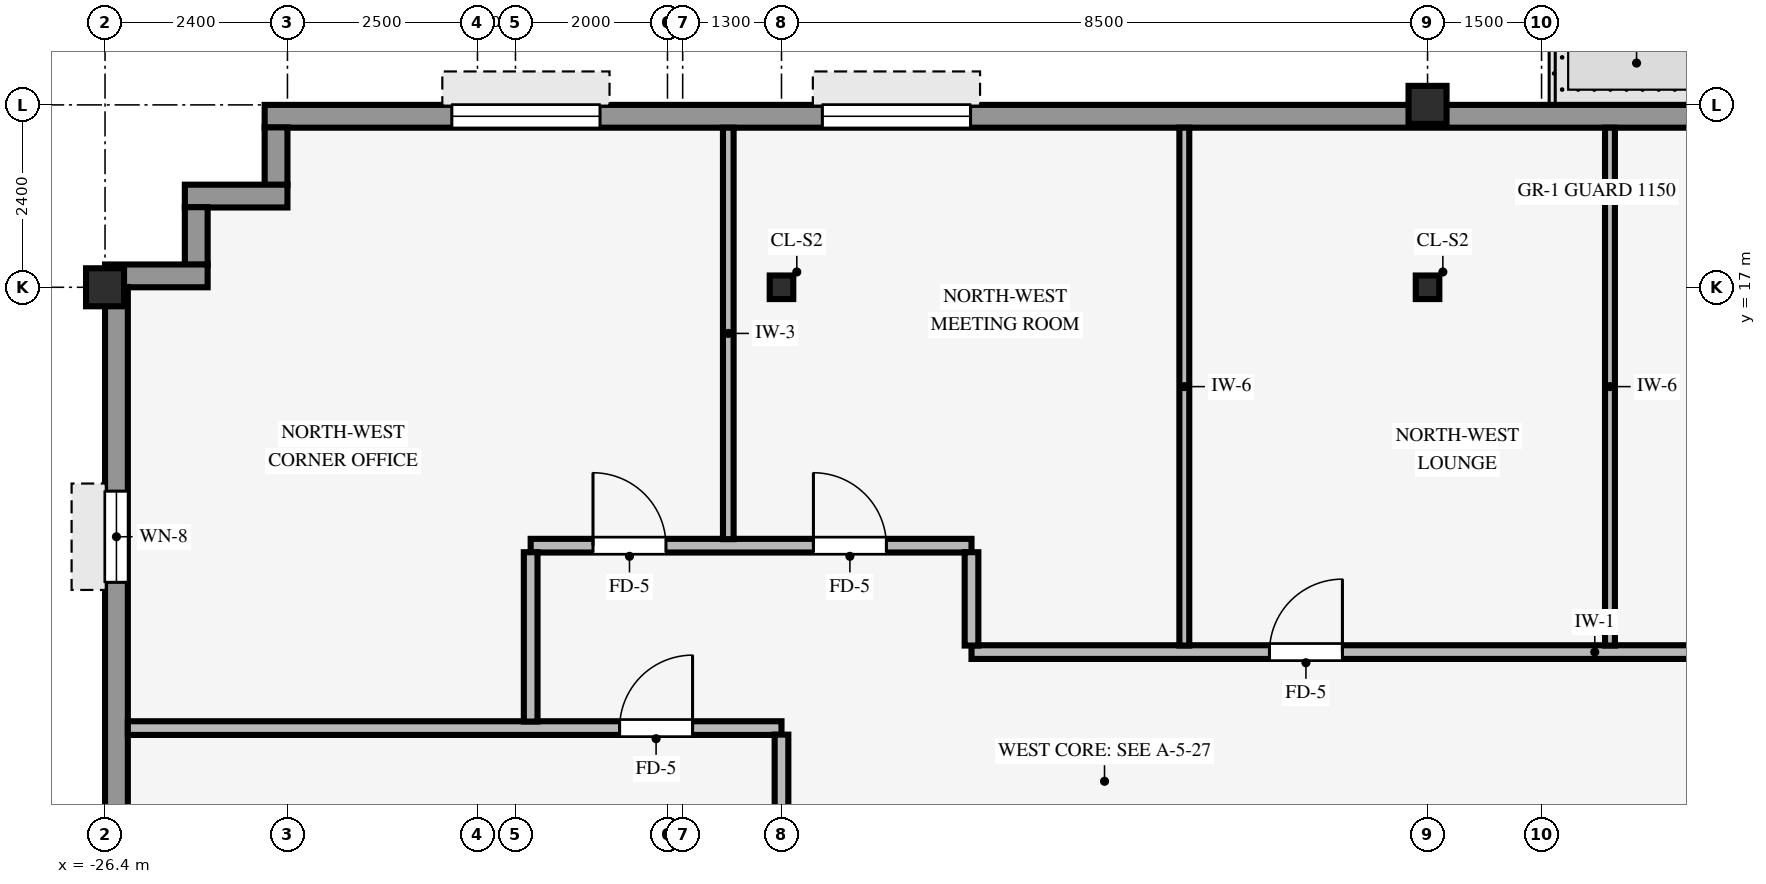
"""IFC4 building model, lengths in metres.
Left out: names, types, materials, properties, quantities, classifications, styles, units other than length and angle.
Written with IfcOpenShell. Run it as: python <this file> out.ifc"""

import sys

from ifc_helpers import new_model, si_unit, direction, frame, frame_2d, origin, origin_2d, place, context, subcontext, project, spatial, rectangle, hollow_rectangle, i_section, extrude, source, transform, mapped, element, fill, save


model = new_model("IFC4")
c1 = context("Model", 3, precision=1e-05, world=origin(), true_north=direction((0.0, 1.0)))
c2 = subcontext(c1, "Body", "Model", "MODEL_VIEW")
j1 = project(units=[si_unit("LENGTHUNIT", "METRE"), si_unit("PLANEANGLEUNIT", "RADIAN")], contexts=[c1])
p1 = place(None, origin())
s1 = spatial("IfcSite", under=j1, at=p1, CompositionType="ELEMENT")
p2 = place(p1, origin())
s2 = spatial("IfcBuilding", under=s1, at=p2, CompositionType="ELEMENT")
p3 = place(p2, frame((0.0, 0.0, 231.05)))
s3 = spatial("IfcBuildingStorey", under=s2, at=p3, CompositionType="ELEMENT", Elevation=231.05)
for number, where, z_axis, x_axis in (
    (1, (-26.4, 17.0, 0.0), (0.0, 0.0, 1.0), (1.0, 0.0, 0.0)),
    (2, (-9.0, 19.4, 0.0), (0.0, 0.0, 1.0), (1.0, 0.0, 0.0)),
):
    element("IfcColumn", number, at=place(p3, frame(where, z_axis=z_axis, x_axis=x_axis)), inside=s3, PredefinedType="COLUMN", context=c2, shape_type="SweptSolid", body=[
        extrude(hollow_rectangle(XDim=0.5, YDim=0.5, WallThickness=0.032, InnerFilletRadius=0.032, OuterFilletRadius=0.064, at=origin_2d()), origin(), (0.0, 0.0, 1.0), 3.37),
    ])
for number, where, z_axis, x_axis in (
    (3, (-17.5, 17.0, 0.0), (0.0, 0.0, 1.0), (1.0, 0.0, 0.0)),
    (4, (-9.0, 17.0, 0.0), (0.0, 0.0, 1.0), (1.0, 0.0, 0.0)),
):
    element("IfcColumn", number, at=place(p3, frame(where, z_axis=z_axis, x_axis=x_axis)), inside=s3, PredefinedType="COLUMN", context=c2, shape_type="SweptSolid", body=[
        extrude(i_section(OverallWidth=0.31, OverallDepth=0.31, WebThickness=0.015, FlangeThickness=0.015, FilletRadius=0.015, at=origin_2d()), origin(), (0.0, 0.0, 1.0), 3.37),
    ])
p4 = place(p3, frame((-24.3, 19.25, 0.0), z_axis=(0.0, 0.0, 1.0), x_axis=(1.0, 0.0, 0.0)))
e5 = element("IfcWall", 5, at=p4, inside=s3, PredefinedType="STANDARD", context=c2, shape_type="SweptSolid", body=[
    extrude(rectangle(XDim=41.0, YDim=0.3, at=frame_2d((20.5, 0.0))), origin(), (0.0, 0.0, 1.0), 2.705),
])
p5 = place(p4, frame((19.0, 0.0, 0.0)))
e6 = element("IfcOpeningElement", 6, at=p5, cuts=e5, PredefinedType="OPENING", context=c2, shape_type="SweptSolid", body=[
    extrude(rectangle(XDim=0.98, YDim=2.15, at=frame_2d((0.49, 1.075))), frame((0.0, 0.16, 0.0), z_axis=(0.0, -1.0, 0.0), x_axis=(1.0, 0.0, 0.0)), (0.0, 0.0, 1.0), 0.32),
])
p6 = place(p4, frame((2.462, 0.0, 0.8)))
e7 = element("IfcOpeningElement", 7, at=p6, cuts=e5, PredefinedType="OPENING", context=c2, shape_type="SweptSolid", body=[
    extrude(rectangle(XDim=1.95, YDim=1.48, at=frame_2d((0.975, 0.74))), frame((0.0, 0.16, 0.0), z_axis=(0.0, -1.0, 0.0), x_axis=(1.0, 0.0, 0.0)), (0.0, 0.0, 1.0), 0.32),
])
p7 = place(p4, frame((7.337, 0.0, 0.8)))
e8 = element("IfcOpeningElement", 8, at=p7, cuts=e5, PredefinedType="OPENING", context=c2, shape_type="SweptSolid", body=[
    extrude(rectangle(XDim=1.95, YDim=1.48, at=frame_2d((0.975, 0.74))), frame((0.0, 0.16, 0.0), z_axis=(0.0, -1.0, 0.0), x_axis=(1.0, 0.0, 0.0)), (0.0, 0.0, 1.0), 0.32),
])
p8 = place(p4, frame((21.512, 0.0, 0.8)))
e9 = element("IfcOpeningElement", 9, at=p8, cuts=e5, PredefinedType="OPENING", context=c2, shape_type="SweptSolid", body=[
    extrude(rectangle(XDim=1.95, YDim=1.48, at=frame_2d((0.975, 0.74))), frame((0.0, 0.16, 0.0), z_axis=(0.0, -1.0, 0.0), x_axis=(1.0, 0.0, 0.0)), (0.0, 0.0, 1.0), 0.32),
])
p9 = place(p4, frame((26.837, 0.0, 0.8)))
e10 = element("IfcOpeningElement", 10, at=p9, cuts=e5, PredefinedType="OPENING", context=c2, shape_type="SweptSolid", body=[
    extrude(rectangle(XDim=1.95, YDim=1.48, at=frame_2d((0.975, 0.74))), frame((0.0, 0.16, 0.0), z_axis=(0.0, -1.0, 0.0), x_axis=(1.0, 0.0, 0.0)), (0.0, 0.0, 1.0), 0.32),
])
p10 = place(p4, frame((37.038, 0.0, 0.8)))
e11 = element("IfcOpeningElement", 11, at=p10, cuts=e5, PredefinedType="OPENING", context=c2, shape_type="SweptSolid", body=[
    extrude(rectangle(XDim=1.95, YDim=1.48, at=frame_2d((0.975, 0.74))), frame((0.0, 0.16, 0.0), z_axis=(0.0, -1.0, 0.0), x_axis=(1.0, 0.0, 0.0)), (0.0, 0.0, 1.0), 0.32),
])
p11 = place(p3, frame((-24.15, 18.346, 0.0), z_axis=(0.0, 0.0, 1.0), x_axis=(0.0, 1.0, 0.0)))
e12 = element("IfcWall", 12, at=p11, inside=s3, PredefinedType="STANDARD", context=c2, shape_type="SweptSolid", body=[
    extrude(rectangle(XDim=0.758, YDim=0.3, at=frame_2d((0.379, 0.0))), origin(), (0.0, 0.0, 1.0), 2.892),
])
p12 = place(p3, frame((-25.35, 18.2, 0.0), z_axis=(0.0, 0.0, 1.0), x_axis=(1.0, 0.0, 0.0)))
e13 = element("IfcWall", 13, at=p12, inside=s3, PredefinedType="STANDARD", context=c2, shape_type="SweptSolid", body=[
    extrude(rectangle(XDim=1.35, YDim=0.3, at=frame_2d((0.675, 0.0))), origin(), (0.0, 0.0, 1.0), 2.892),
])
p13 = place(p3, frame((-25.2, 17.296, 0.0), z_axis=(0.0, 0.0, 1.0), x_axis=(0.0, 1.0, 0.0)))
e14 = element("IfcWall", 14, at=p13, inside=s3, PredefinedType="STANDARD", context=c2, shape_type="SweptSolid", body=[
    extrude(rectangle(XDim=0.758, YDim=0.3, at=frame_2d((0.379, 0.0))), origin(), (0.0, 0.0, 1.0), 2.892),
])
p14 = place(p3, frame((-26.4, 17.15, 0.0), z_axis=(0.0, 0.0, 1.0), x_axis=(1.0, 0.0, 0.0)))
e15 = element("IfcWall", 15, at=p14, inside=s3, PredefinedType="STANDARD", context=c2, shape_type="SweptSolid", body=[
    extrude(rectangle(XDim=1.35, YDim=0.3, at=frame_2d((0.675, 0.0))), origin(), (0.0, 0.0, 1.0), 2.892),
])
p15 = place(p3, frame((-26.25, -17.004, 0.0), z_axis=(0.0, 0.0, 1.0), x_axis=(0.0, 1.0, 0.0)))
e16 = element("IfcWall", 16, at=p15, inside=s3, PredefinedType="STANDARD", context=c2, shape_type="SweptSolid", body=[
    extrude(rectangle(XDim=34.008, YDim=0.3, at=frame_2d((17.004, 0.0))), origin(), (0.0, 0.0, 1.0), 2.705),
])
p16 = place(p15, frame((2.686, 0.0, 0.8)))
e17 = element("IfcOpeningElement", 17, at=p16, cuts=e16, PredefinedType="OPENING", context=c2, shape_type="SweptSolid", body=[
    extrude(rectangle(XDim=1.2, YDim=1.48, at=frame_2d((0.6, 0.74))), frame((0.0, 0.16, 0.0), z_axis=(0.0, -1.0, 0.0), x_axis=(1.0, 0.0, 0.0)), (0.0, 0.0, 1.0), 0.32),
])
p17 = place(p15, frame((8.159, 0.0, 0.8)))
e18 = element("IfcOpeningElement", 18, at=p17, cuts=e16, PredefinedType="OPENING", context=c2, shape_type="SweptSolid", body=[
    extrude(rectangle(XDim=1.2, YDim=1.48, at=frame_2d((0.6, 0.74))), frame((0.0, 0.16, 0.0), z_axis=(0.0, -1.0, 0.0), x_axis=(1.0, 0.0, 0.0)), (0.0, 0.0, 1.0), 0.32),
])
p18 = place(p15, frame((11.831, 0.0, 0.8)))
e19 = element("IfcOpeningElement", 19, at=p18, cuts=e16, PredefinedType="OPENING", context=c2, shape_type="SweptSolid", body=[
    extrude(rectangle(XDim=1.2, YDim=1.48, at=frame_2d((0.6, 0.74))), frame((0.0, 0.16, 0.0), z_axis=(0.0, -1.0, 0.0), x_axis=(1.0, 0.0, 0.0)), (0.0, 0.0, 1.0), 0.32),
])
p19 = place(p15, frame((17.754, 0.0, 0.8)))
e20 = element("IfcOpeningElement", 20, at=p19, cuts=e16, PredefinedType="OPENING", context=c2, shape_type="SweptSolid", body=[
    extrude(rectangle(XDim=1.2, YDim=1.48, at=frame_2d((0.6, 0.74))), frame((0.0, 0.16, 0.0), z_axis=(0.0, -1.0, 0.0), x_axis=(1.0, 0.0, 0.0)), (0.0, 0.0, 1.0), 0.32),
])
p20 = place(p15, frame((20.977, 0.0, 0.8)))
e21 = element("IfcOpeningElement", 21, at=p20, cuts=e16, PredefinedType="OPENING", context=c2, shape_type="SweptSolid", body=[
    extrude(rectangle(XDim=1.2, YDim=1.48, at=frame_2d((0.6, 0.74))), frame((0.0, 0.16, 0.0), z_axis=(0.0, -1.0, 0.0), x_axis=(1.0, 0.0, 0.0)), (0.0, 0.0, 1.0), 0.32),
])
p21 = place(p15, frame((24.649, 0.0, 0.8)))
e22 = element("IfcOpeningElement", 22, at=p21, cuts=e16, PredefinedType="OPENING", context=c2, shape_type="SweptSolid", body=[
    extrude(rectangle(XDim=1.2, YDim=1.48, at=frame_2d((0.6, 0.74))), frame((0.0, 0.16, 0.0), z_axis=(0.0, -1.0, 0.0), x_axis=(1.0, 0.0, 0.0)), (0.0, 0.0, 1.0), 0.32),
])
p22 = place(p15, frame((30.122, 0.0, 0.8)))
e23 = element("IfcOpeningElement", 23, at=p22, cuts=e16, PredefinedType="OPENING", context=c2, shape_type="SweptSolid", body=[
    extrude(rectangle(XDim=1.2, YDim=1.48, at=frame_2d((0.6, 0.74))), frame((0.0, 0.16, 0.0), z_axis=(0.0, -1.0, 0.0), x_axis=(1.0, 0.0, 0.0)), (0.0, 0.0, 1.0), 0.32),
])
p23 = place(p3, frame((-26.1, 11.2, 0.0), z_axis=(0.0, 0.0, 1.0), x_axis=(1.0, 0.0, 0.0)))
e24 = element("IfcWall", 24, at=p23, inside=s3, PredefinedType="PARTITIONING", context=c2, shape_type="SweptSolid", body=[
    extrude(rectangle(XDim=8.6, YDim=0.18, at=frame_2d((4.3, 0.0))), origin(), (0.0, 0.0, 1.0), 3.36),
])
p24 = place(p23, frame((6.47, 0.0, 0.0)))
e25 = element("IfcOpeningElement", 25, at=p24, cuts=e24, PredefinedType="OPENING", context=c2, shape_type="SweptSolid", body=[
    extrude(rectangle(XDim=0.96, YDim=2.1, at=frame_2d((0.48, 1.05))), frame((0.0, 0.1, 0.0), z_axis=(0.0, -1.0, 0.0), x_axis=(1.0, 0.0, 0.0)), (0.0, 0.0, 1.0), 0.2),
])
p25 = place(p3, frame((-15.0, 12.2, 0.0), z_axis=(0.0, 0.0, 1.0), x_axis=(1.0, 0.0, 0.0)))
e26 = element("IfcWall", 26, at=p25, inside=s3, PredefinedType="PARTITIONING", context=c2, shape_type="SweptSolid", body=[
    extrude(rectangle(XDim=30.8, YDim=0.18, at=frame_2d((15.4, 0.0))), origin(), (0.0, 0.0, 1.0), 3.36),
])
p26 = place(p25, frame((11.52, 0.0, 0.0)))
e27 = element("IfcOpeningElement", 27, at=p26, cuts=e26, PredefinedType="OPENING", context=c2, shape_type="SweptSolid", body=[
    extrude(rectangle(XDim=0.96, YDim=2.1, at=frame_2d((0.48, 1.05))), frame((0.0, 0.1, 0.0), z_axis=(0.0, -1.0, 0.0), x_axis=(1.0, 0.0, 0.0)), (0.0, 0.0, 1.0), 0.2),
])
p27 = place(p25, frame((25.22, 0.0, 0.0)))
e28 = element("IfcOpeningElement", 28, at=p27, cuts=e26, PredefinedType="OPENING", context=c2, shape_type="SweptSolid", body=[
    extrude(rectangle(XDim=0.96, YDim=2.1, at=frame_2d((0.48, 1.05))), frame((0.0, 0.1, 0.0), z_axis=(0.0, -1.0, 0.0), x_axis=(1.0, 0.0, 0.0)), (0.0, 0.0, 1.0), 0.2),
])
p28 = place(p25, frame((28.62, 0.0, 0.0)))
e29 = element("IfcOpeningElement", 29, at=p28, cuts=e26, PredefinedType="OPENING", context=c2, shape_type="SweptSolid", body=[
    extrude(rectangle(XDim=0.96, YDim=2.1, at=frame_2d((0.48, 1.05))), frame((0.0, 0.1, 0.0), z_axis=(0.0, -1.0, 0.0), x_axis=(1.0, 0.0, 0.0)), (0.0, 0.0, 1.0), 0.2),
])
p29 = place(p25, frame((3.92, 0.0, 0.0)))
e30 = element("IfcOpeningElement", 30, at=p29, cuts=e26, PredefinedType="OPENING", context=c2, shape_type="SweptSolid", body=[
    extrude(rectangle(XDim=0.96, YDim=2.1, at=frame_2d((0.48, 1.05))), frame((0.0, 0.1, 0.0), z_axis=(0.0, -1.0, 0.0), x_axis=(1.0, 0.0, 0.0)), (0.0, 0.0, 1.0), 0.2),
])
p30 = place(p25, frame((16.2, 0.0, 0.0)))
e31 = element("IfcOpeningElement", 31, at=p30, cuts=e26, PredefinedType="OPENING", context=c2, shape_type="SweptSolid", body=[
    extrude(rectangle(XDim=0.9, YDim=2.1, at=frame_2d((0.45, 1.05))), frame((0.0, 0.1, 0.0), z_axis=(0.0, -1.0, 0.0), x_axis=(1.0, 0.0, 0.0)), (0.0, 0.0, 1.0), 0.2),
])
p31 = place(p25, frame((18.3, 0.0, 0.0)))
e32 = element("IfcOpeningElement", 32, at=p31, cuts=e26, PredefinedType="OPENING", context=c2, shape_type="SweptSolid", body=[
    extrude(rectangle(XDim=0.9, YDim=2.1, at=frame_2d((0.45, 1.05))), frame((0.0, 0.1, 0.0), z_axis=(0.0, -1.0, 0.0), x_axis=(1.0, 0.0, 0.0)), (0.0, 0.0, 1.0), 0.2),
])
p32 = place(p25, frame((20.25, 0.0, 0.0)))
e33 = element("IfcOpeningElement", 33, at=p32, cuts=e26, PredefinedType="OPENING", context=c2, shape_type="SweptSolid", body=[
    extrude(rectangle(XDim=0.9, YDim=2.1, at=frame_2d((0.45, 1.05))), frame((0.0, 0.1, 0.0), z_axis=(0.0, -1.0, 0.0), x_axis=(1.0, 0.0, 0.0)), (0.0, 0.0, 1.0), 0.2),
])
p33 = place(p3, frame((-20.8, 13.6, 0.0), z_axis=(0.0, 0.0, 1.0), x_axis=(1.0, 0.0, 0.0)))
e34 = element("IfcWall", 34, at=p33, inside=s3, PredefinedType="PARTITIONING", context=c2, shape_type="SweptSolid", body=[
    extrude(rectangle(XDim=5.8, YDim=0.18, at=frame_2d((2.9, 0.0))), origin(), (0.0, 0.0, 1.0), 3.049),
])
p34 = place(p33, frame((3.72, 0.0, 0.0)))
e35 = element("IfcOpeningElement", 35, at=p34, cuts=e34, PredefinedType="OPENING", context=c2, shape_type="SweptSolid", body=[
    extrude(rectangle(XDim=0.96, YDim=2.1, at=frame_2d((0.48, 1.05))), frame((0.0, 0.1, 0.0), z_axis=(0.0, -1.0, 0.0), x_axis=(1.0, 0.0, 0.0)), (0.0, 0.0, 1.0), 0.2),
])
p35 = place(p33, frame((0.82, 0.0, 0.0)))
e36 = element("IfcOpeningElement", 36, at=p35, cuts=e34, PredefinedType="OPENING", context=c2, shape_type="SweptSolid", body=[
    extrude(rectangle(XDim=0.96, YDim=2.1, at=frame_2d((0.48, 1.05))), frame((0.0, 0.1, 0.0), z_axis=(0.0, -1.0, 0.0), x_axis=(1.0, 0.0, 0.0)), (0.0, 0.0, 1.0), 0.2),
])
p36 = place(p3, frame((-20.8, 11.286, 0.0), z_axis=(0.0, 0.0, 1.0), x_axis=(0.0, 1.0, 0.0)))
e37 = element("IfcWall", 37, at=p36, inside=s3, PredefinedType="PARTITIONING", context=c2, shape_type="SweptSolid", body=[
    extrude(rectangle(XDim=2.228, YDim=0.18, at=frame_2d((1.114, 0.0))), origin(), (0.0, 0.0, 1.0), 3.36),
])
p37 = place(p3, frame((-18.2, 13.686, 0.0), z_axis=(0.0, 0.0, 1.0), x_axis=(0.0, 1.0, 0.0)))
e38 = element("IfcWall", 38, at=p37, inside=s3, PredefinedType="PARTITIONING", context=c2, shape_type="SweptSolid", body=[
    extrude(rectangle(XDim=5.414, YDim=0.14, at=frame_2d((2.707, 0.0))), origin(), (0.0, 0.0, 1.0), 3.36),
])
p38 = place(p3, frame((-17.5, 9.996, 0.0), z_axis=(0.0, 0.0, 1.0), x_axis=(0.0, 1.0, 0.0)))
e39 = element("IfcWall", 39, at=p38, inside=s3, PredefinedType="PARTITIONING", context=c2, shape_type="SweptSolid", body=[
    extrude(rectangle(XDim=1.118, YDim=0.18, at=frame_2d((0.559, 0.0))), origin(), (0.0, 0.0, 1.0), 2.892),
])
p39 = place(p3, frame((-15.0, 12.286, 0.0), z_axis=(0.0, 0.0, 1.0), x_axis=(0.0, 1.0, 0.0)))
e40 = element("IfcWall", 40, at=p39, inside=s3, PredefinedType="PARTITIONING", context=c2, shape_type="SweptSolid", body=[
    extrude(rectangle(XDim=1.228, YDim=0.18, at=frame_2d((0.614, 0.0))), origin(), (0.0, 0.0, 1.0), 3.36),
])
for number, where, z_axis, x_axis in (
    (41, (-12.2, 12.286, 0.0), (0.0, 0.0, 1.0), (0.0, 1.0, 0.0)),
    (42, (-6.6, 12.286, 0.0), (0.0, 0.0, 1.0), (0.0, 1.0, 0.0)),
):
    element("IfcWall", number, at=place(p3, frame(where, z_axis=z_axis, x_axis=x_axis)), inside=s3, PredefinedType="PARTITIONING", context=c2, shape_type="SweptSolid", body=[
        extrude(rectangle(XDim=6.814, YDim=0.13, at=frame_2d((3.407, 0.0))), origin(), (0.0, 0.0, 1.0), 3.36),
    ])
m1 = source(origin(), c2, "Body", "SweptSolid", [
    extrude(rectangle(XDim=1.95, YDim=1.48, at=frame_2d((0.975, 0.74))), frame((0.0, 0.03, 0.0), z_axis=(0.0, -1.0, 0.0), x_axis=(1.0, 0.0, 0.0)), (0.0, 0.0, 1.0), 0.06),
])
p40 = place(p6, origin())
e43 = element("IfcWindow", 43, at=p40, inside=s3, PartitioningType="SINGLE_PANEL", PredefinedType="WINDOW", context=c2, shape_type="MappedRepresentation", body=[
    mapped(m1, transform((0.0, 0.0, 0.0), scale=1.0)),
])
fill(e7, e43)
p41 = place(p7, origin())
e44 = element("IfcWindow", 44, at=p41, inside=s3, PartitioningType="SINGLE_PANEL", PredefinedType="WINDOW", context=c2, shape_type="MappedRepresentation", body=[
    mapped(m1, transform((0.0, 0.0, 0.0), scale=1.0)),
])
fill(e8, e44)
m2 = source(origin(), c2, "Body", "SweptSolid", [
    extrude(rectangle(XDim=1.2, YDim=1.48, at=frame_2d((0.6, 0.74))), frame((0.0, 0.03, 0.0), z_axis=(0.0, -1.0, 0.0), x_axis=(1.0, 0.0, 0.0)), (0.0, 0.0, 1.0), 0.06),
])
p42 = place(p22, origin())
e45 = element("IfcWindow", 45, at=p42, inside=s3, PartitioningType="SINGLE_PANEL", PredefinedType="WINDOW", context=c2, shape_type="MappedRepresentation", body=[
    mapped(m2, transform((0.0, 0.0, 0.0), scale=1.0)),
])
fill(e23, e45)
m3 = source(origin(), c2, "Body", "SweptSolid", [
    extrude(rectangle(XDim=0.96, YDim=2.1, at=frame_2d((0.48, 1.05))), frame((0.0, 0.025, 0.0), z_axis=(0.0, -1.0, 0.0), x_axis=(1.0, 0.0, 0.0)), (0.0, 0.0, 1.0), 0.05),
])
p43 = place(p24, origin())
e46 = element("IfcDoor", 46, at=p43, inside=s3, OperationType="SINGLE_SWING_RIGHT", PredefinedType="DOOR", context=c2, shape_type="MappedRepresentation", body=[
    mapped(m3, transform((0.0, 0.0, 0.0), scale=1.0)),
])
fill(e25, e46)
p44 = place(p34, origin())
e47 = element("IfcDoor", 47, at=p44, inside=s3, OperationType="SINGLE_SWING_LEFT", PredefinedType="DOOR", context=c2, shape_type="MappedRepresentation", body=[
    mapped(m3, transform((0.0, 0.0, 0.0), scale=1.0)),
])
fill(e35, e47)
p45 = place(p29, origin())
e48 = element("IfcDoor", 48, at=p45, inside=s3, OperationType="SINGLE_SWING_RIGHT", PredefinedType="DOOR", context=c2, shape_type="MappedRepresentation", body=[
    mapped(m3, transform((0.0, 0.0, 0.0), scale=1.0)),
])
fill(e30, e48)
p46 = place(p35, origin())
e49 = element("IfcDoor", 49, at=p46, inside=s3, OperationType="SINGLE_SWING_LEFT", PredefinedType="DOOR", context=c2, shape_type="MappedRepresentation", body=[
    mapped(m3, transform((0.0, 0.0, 0.0), scale=1.0)),
])
fill(e36, e49)
save(model, sys.argv[1])
